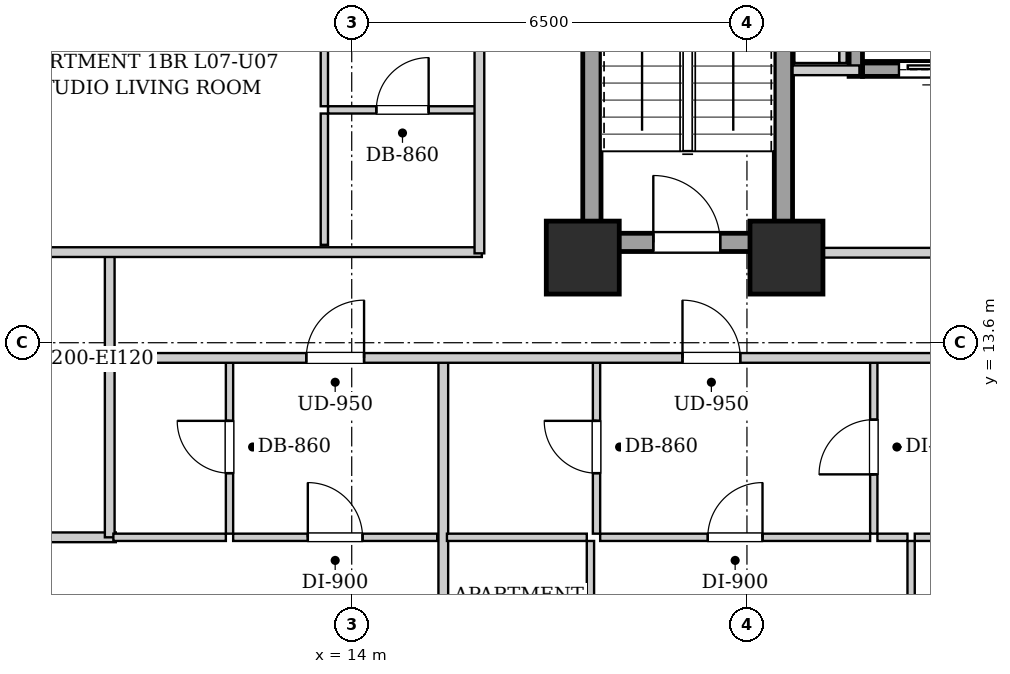
"""IFC4 building model, lengths in metres.
Left out: names, types, materials, properties, quantities, classifications, styles, units other than length and angle.
Written with IfcOpenShell. Run it as: python <this file> out.ifc"""

import sys

from ifc_helpers import new_model, si_unit, direction, frame, frame_2d, origin, origin_2d, place, context, subcontext, project, spatial, rectangle, extrude, element, fill, save


model = new_model("IFC4")
c1 = context("Model", 3, precision=1e-05, world=origin(), true_north=direction((0.0, 1.0)))
c2 = subcontext(c1, "Body", "Model", "MODEL_VIEW")
j1 = project(units=[si_unit("LENGTHUNIT", "METRE"), si_unit("PLANEANGLEUNIT", "RADIAN")], contexts=[c1])
p1 = place(None, origin())
s1 = spatial("IfcSite", under=j1, at=p1, CompositionType="ELEMENT")
p2 = place(p1, origin())
s2 = spatial("IfcBuilding", under=s1, at=p2, CompositionType="ELEMENT")
p3 = place(p2, frame((0.0, 0.0, 32.2)))
s3 = spatial("IfcBuildingStorey", under=s2, at=p3, CompositionType="ELEMENT", Elevation=32.2)
for number, where, z_axis, x_axis in (
    (1, (17.8, 15.0, 0.0), (0.0, 0.0, 1.0), (1.0, 0.0, 0.0)),
    (2, (21.15, 15.0, 0.0), (0.0, 0.0, 1.0), (1.0, 0.0, 0.0)),
):
    element("IfcColumn", number, at=place(p3, frame(where, z_axis=z_axis, x_axis=x_axis)), inside=s3, PredefinedType="COLUMN", context=c2, shape_type="SweptSolid", body=[
        extrude(rectangle(XDim=1.2, YDim=1.2, at=origin_2d()), origin(), (0.0, 0.0, 1.0), 3.2),
    ])
for number, where, z_axis, x_axis in (
    (3, (17.95, 15.1, 0.0), (0.0, 0.0, 1.0), (0.0, 1.0, 0.0)),
    (4, (21.1, 15.1, 0.0), (0.0, 0.0, 1.0), (0.0, 1.0, 0.0)),
):
    element("IfcWall", number, at=place(p3, frame(where, z_axis=z_axis, x_axis=x_axis)), inside=s3, PredefinedType="SHEAR", context=c2, shape_type="SweptSolid", body=[
        extrude(rectangle(XDim=9.0, YDim=0.3, at=frame_2d((4.5, 0.0))), origin(), (0.0, 0.0, 1.0), 2.94),
    ])
p4 = place(p3, frame((18.1, 15.25, 0.0), z_axis=(0.0, 0.0, 1.0), x_axis=(1.0, 0.0, 0.0)))
e5 = element("IfcWall", 5, at=p4, inside=s3, PredefinedType="SHEAR", context=c2, shape_type="SweptSolid", body=[
    extrude(rectangle(XDim=2.85, YDim=0.3, at=frame_2d((1.425, 0.0))), origin(), (0.0, 0.0, 1.0), 2.94),
])
p5 = place(p4, frame((0.86, 0.0, 0.0)))
e6 = element("IfcOpeningElement", 6, at=p5, cuts=e5, PredefinedType="OPENING", context=c2, shape_type="SweptSolid", body=[
    extrude(rectangle(XDim=1.1, YDim=2.05, at=frame_2d((0.55, 1.025))), frame((0.0, 0.16, 0.0), z_axis=(0.0, -1.0, 0.0), x_axis=(1.0, 0.0, 0.0)), (0.0, 0.0, 1.0), 0.32),
])
p6 = place(p3, frame((22.4, 18.09, 0.0), z_axis=(0.0, 0.0, 1.0), x_axis=(1.0, 0.0, 0.0)))
e7 = element("IfcWall", 7, at=p6, inside=s3, PredefinedType="SHEAR", context=c2, shape_type="SweptSolid", body=[
    extrude(rectangle(XDim=2.4, YDim=0.22, at=frame_2d((1.2, 0.0))), origin(), (0.0, 0.0, 1.0), 2.94),
])
p7 = place(p6, frame((0.6, 0.0, 0.0)))
e8 = element("IfcOpeningElement", 8, at=p7, cuts=e7, PredefinedType="OPENING", context=c2, shape_type="SweptSolid", body=[
    extrude(rectangle(XDim=1.2, YDim=2.15, at=frame_2d((0.6, 1.075))), frame((0.0, 0.12, 0.0), z_axis=(0.0, -1.0, 0.0), x_axis=(1.0, 0.0, 0.0)), (0.0, 0.0, 1.0), 0.24),
])
p8 = place(p3, frame((22.29, 17.98, 0.0), z_axis=(0.0, 0.0, 1.0), x_axis=(0.0, 1.0, 0.0)))
e9 = element("IfcWall", 9, at=p8, inside=s3, PredefinedType="SHEAR", context=c2, shape_type="SweptSolid", body=[
    extrude(rectangle(XDim=2.54, YDim=0.22, at=frame_2d((1.27, 0.0))), origin(), (0.0, 0.0, 1.0), 2.94),
])
p9 = place(p3, frame((21.25, 15.08, 0.0), z_axis=(0.0, 0.0, 1.0), x_axis=(1.0, 0.0, 0.0)))
e10 = element("IfcWall", 10, at=p9, inside=s3, PredefinedType="PARTITIONING", context=c2, shape_type="SweptSolid", body=[
    extrude(rectangle(XDim=8.5, YDim=0.16, at=frame_2d((4.25, 0.0))), origin(), (0.0, 0.0, 1.0), 2.155),
])
p10 = place(p9, frame((3.725, 0.0, 0.0)))
e11 = element("IfcOpeningElement", 11, at=p10, cuts=e10, PredefinedType="OPENING", context=c2, shape_type="SweptSolid", body=[
    extrude(rectangle(XDim=1.05, YDim=2.05, at=frame_2d((0.525, 1.025))), frame((0.0, 0.09, 0.0), z_axis=(0.0, -1.0, 0.0), x_axis=(1.0, 0.0, 0.0)), (0.0, 0.0, 1.0), 0.18),
])
p11 = place(p3, frame((21.25, 18.08, 0.0), z_axis=(0.0, 0.0, 1.0), x_axis=(1.0, 0.0, 0.0)))
e12 = element("IfcWall", 12, at=p11, inside=s3, PredefinedType="PARTITIONING", context=c2, shape_type="SweptSolid", body=[
    extrude(rectangle(XDim=1.1, YDim=0.16, at=frame_2d((0.55, 0.0))), origin(), (0.0, 0.0, 1.0), 2.94),
])
p12 = place(p3, frame((22.08, 18.2, 0.0), z_axis=(0.0, 0.0, 1.0), x_axis=(0.0, 1.0, 0.0)))
e13 = element("IfcWall", 13, at=p12, inside=s3, PredefinedType="PARTITIONING", context=c2, shape_type="SweptSolid", body=[
    extrude(rectangle(XDim=2.12, YDim=0.12, at=frame_2d((1.06, 0.0))), origin(), (0.0, 0.0, 1.0), 2.94),
])
p13 = place(p3, frame((10.02, 13.35, 0.0), z_axis=(0.0, 0.0, 1.0), x_axis=(0.0, 1.0, 0.0)))
e14 = element("IfcWall", 14, at=p13, inside=s3, PredefinedType="PARTITIONING", context=c2, shape_type="SweptSolid", body=[
    extrude(rectangle(XDim=1.74, YDim=0.16, at=frame_2d((0.87, 0.0))), origin(), (0.0, 0.0, 1.0), 2.94),
])
p14 = place(p3, frame((7.78, 15.09, 0.0), z_axis=(0.0, 0.0, 1.0), x_axis=(1.0, 0.0, 0.0)))
e15 = element("IfcWall", 15, at=p14, inside=s3, PredefinedType="PARTITIONING", context=c2, shape_type="SweptSolid", body=[
    extrude(rectangle(XDim=8.36, YDim=0.16, at=frame_2d((4.18, 0.0))), origin(), (0.0, 0.0, 1.0), 2.155),
])
p15 = place(p3, frame((7.78, 10.4, 0.0), z_axis=(0.0, 0.0, 1.0), x_axis=(1.0, 0.0, 0.0)))
e16 = element("IfcWall", 16, at=p15, inside=s3, PredefinedType="PARTITIONING", context=c2, shape_type="SweptSolid", body=[
    extrude(rectangle(XDim=2.34, YDim=0.16, at=frame_2d((1.17, 0.0))), origin(), (0.0, 0.0, 1.0), 2.94),
])
p16 = place(p3, frame((10.02, 10.4, 0.0), z_axis=(0.0, 0.0, 1.0), x_axis=(0.0, 1.0, 0.0)))
e17 = element("IfcWall", 17, at=p16, inside=s3, PredefinedType="PARTITIONING", context=c2, shape_type="SweptSolid", body=[
    extrude(rectangle(XDim=2.91, YDim=0.16, at=frame_2d((1.455, 0.0))), origin(), (0.0, 0.0, 1.0), 2.94),
])
p17 = place(p3, frame((11.99, 10.46, 0.0), z_axis=(0.0, 0.0, 1.0), x_axis=(0.0, 1.0, 0.0)))
e18 = element("IfcWall", 18, at=p17, inside=s3, PredefinedType="PARTITIONING", context=c2, shape_type="SweptSolid", body=[
    extrude(rectangle(XDim=2.85, YDim=0.12, at=frame_2d((1.425, 0.0))), origin(), (0.0, 0.0, 1.0), 2.94),
])
p18 = place(p17, frame((0.995, 0.0, 0.0)))
e19 = element("IfcOpeningElement", 19, at=p18, cuts=e18, PredefinedType="OPENING", context=c2, shape_type="SweptSolid", body=[
    extrude(rectangle(XDim=0.86, YDim=2.05, at=frame_2d((0.43, 1.025))), frame((0.0, 0.07, 0.0), z_axis=(0.0, -1.0, 0.0), x_axis=(1.0, 0.0, 0.0)), (0.0, 0.0, 1.0), 0.14),
])
p19 = place(p3, frame((10.08, 10.4, 0.0), z_axis=(0.0, 0.0, 1.0), x_axis=(1.0, 0.0, 0.0)))
e20 = element("IfcWall", 20, at=p19, inside=s3, PredefinedType="PARTITIONING", context=c2, shape_type="SweptSolid", body=[
    extrude(rectangle(XDim=1.85, YDim=0.12, at=frame_2d((0.925, 0.0))), origin(), (0.0, 0.0, 1.0), 2.94),
])
p20 = place(p3, frame((12.05, 10.4, 0.0), z_axis=(0.0, 0.0, 1.0), x_axis=(1.0, 0.0, 0.0)))
e21 = element("IfcWall", 21, at=p20, inside=s3, PredefinedType="PARTITIONING", context=c2, shape_type="SweptSolid", body=[
    extrude(rectangle(XDim=3.356, YDim=0.12, at=frame_2d((1.678, 0.0))), origin(), (0.0, 0.0, 1.0), 2.94),
])
p21 = place(p20, frame((1.228, 0.0, 0.0)))
e22 = element("IfcOpeningElement", 22, at=p21, cuts=e21, PredefinedType="OPENING", context=c2, shape_type="SweptSolid", body=[
    extrude(rectangle(XDim=0.9, YDim=2.05, at=frame_2d((0.45, 1.025))), frame((0.0, 0.07, 0.0), z_axis=(0.0, -1.0, 0.0), x_axis=(1.0, 0.0, 0.0)), (0.0, 0.0, 1.0), 0.14),
])
p22 = place(p3, frame((15.506, 2.26, 0.0), z_axis=(0.0, 0.0, 1.0), x_axis=(0.0, 1.0, 0.0)))
e23 = element("IfcWall", 23, at=p22, inside=s3, PredefinedType="PARTITIONING", context=c2, shape_type="SweptSolid", body=[
    extrude(rectangle(XDim=11.05, YDim=0.16, at=frame_2d((5.525, 0.0))), origin(), (0.0, 0.0, 1.0), 2.94),
])
p23 = place(p3, frame((18.026, 10.46, 0.0), z_axis=(0.0, 0.0, 1.0), x_axis=(0.0, 1.0, 0.0)))
e24 = element("IfcWall", 24, at=p23, inside=s3, PredefinedType="PARTITIONING", context=c2, shape_type="SweptSolid", body=[
    extrude(rectangle(XDim=2.85, YDim=0.12, at=frame_2d((1.425, 0.0))), origin(), (0.0, 0.0, 1.0), 2.94),
])
p24 = place(p23, frame((0.995, 0.0, 0.0)))
e25 = element("IfcOpeningElement", 25, at=p24, cuts=e24, PredefinedType="OPENING", context=c2, shape_type="SweptSolid", body=[
    extrude(rectangle(XDim=0.86, YDim=2.05, at=frame_2d((0.43, 1.025))), frame((0.0, 0.07, 0.0), z_axis=(0.0, -1.0, 0.0), x_axis=(1.0, 0.0, 0.0)), (0.0, 0.0, 1.0), 0.14),
])
p25 = place(p3, frame((15.566, 10.4, 0.0), z_axis=(0.0, 0.0, 1.0), x_axis=(1.0, 0.0, 0.0)))
e26 = element("IfcWall", 26, at=p25, inside=s3, PredefinedType="PARTITIONING", context=c2, shape_type="SweptSolid", body=[
    extrude(rectangle(XDim=2.3, YDim=0.12, at=frame_2d((1.15, 0.0))), origin(), (0.0, 0.0, 1.0), 2.94),
])
p26 = place(p3, frame((22.586, 10.46, 0.0), z_axis=(0.0, 0.0, 1.0), x_axis=(0.0, 1.0, 0.0)))
e27 = element("IfcWall", 27, at=p26, inside=s3, PredefinedType="PARTITIONING", context=c2, shape_type="SweptSolid", body=[
    extrude(rectangle(XDim=2.85, YDim=0.12, at=frame_2d((1.425, 0.0))), origin(), (0.0, 0.0, 1.0), 2.94),
])
p27 = place(p26, frame((0.975, 0.0, 0.0)))
e28 = element("IfcOpeningElement", 28, at=p27, cuts=e27, PredefinedType="OPENING", context=c2, shape_type="SweptSolid", body=[
    extrude(rectangle(XDim=0.9, YDim=2.05, at=frame_2d((0.45, 1.025))), frame((0.0, 0.07, 0.0), z_axis=(0.0, -1.0, 0.0), x_axis=(1.0, 0.0, 0.0)), (0.0, 0.0, 1.0), 0.14),
])
p28 = place(p3, frame((18.086, 10.4, 0.0), z_axis=(0.0, 0.0, 1.0), x_axis=(1.0, 0.0, 0.0)))
e29 = element("IfcWall", 29, at=p28, inside=s3, PredefinedType="PARTITIONING", context=c2, shape_type="SweptSolid", body=[
    extrude(rectangle(XDim=4.44, YDim=0.12, at=frame_2d((2.22, 0.0))), origin(), (0.0, 0.0, 1.0), 2.94),
])
p29 = place(p28, frame((1.77, 0.0, 0.0)))
e30 = element("IfcOpeningElement", 30, at=p29, cuts=e29, PredefinedType="OPENING", context=c2, shape_type="SweptSolid", body=[
    extrude(rectangle(XDim=0.9, YDim=2.05, at=frame_2d((0.45, 1.025))), frame((0.0, 0.07, 0.0), z_axis=(0.0, -1.0, 0.0), x_axis=(1.0, 0.0, 0.0)), (0.0, 0.0, 1.0), 0.14),
])
p30 = place(p3, frame((22.646, 10.4, 0.0), z_axis=(0.0, 0.0, 1.0), x_axis=(1.0, 0.0, 0.0)))
e31 = element("IfcWall", 31, at=p30, inside=s3, PredefinedType="PARTITIONING", context=c2, shape_type="SweptSolid", body=[
    extrude(rectangle(XDim=0.494, YDim=0.12, at=frame_2d((0.247, 0.0))), origin(), (0.0, 0.0, 1.0), 2.94),
])
p31 = place(p3, frame((23.26, 10.4, 0.0), z_axis=(0.0, 0.0, 1.0), x_axis=(1.0, 0.0, 0.0)))
e32 = element("IfcWall", 32, at=p31, inside=s3, PredefinedType="PARTITIONING", context=c2, shape_type="SweptSolid", body=[
    extrude(rectangle(XDim=2.536, YDim=0.12, at=frame_2d((1.268, 0.0))), origin(), (0.0, 0.0, 1.0), 2.94),
])
p32 = place(p31, frame((0.818, 0.0, 0.0)))
e33 = element("IfcOpeningElement", 33, at=p32, cuts=e32, PredefinedType="OPENING", context=c2, shape_type="SweptSolid", body=[
    extrude(rectangle(XDim=0.9, YDim=2.05, at=frame_2d((0.45, 1.025))), frame((0.0, 0.07, 0.0), z_axis=(0.0, -1.0, 0.0), x_axis=(1.0, 0.0, 0.0)), (0.0, 0.0, 1.0), 0.14),
])
p33 = place(p3, frame((17.926, 0.28, 0.0), z_axis=(0.0, 0.0, 1.0), x_axis=(0.0, 1.0, 0.0)))
e34 = element("IfcWall", 34, at=p33, inside=s3, PredefinedType="PARTITIONING", context=c2, shape_type="SweptSolid", body=[
    extrude(rectangle(XDim=10.06, YDim=0.12, at=frame_2d((5.03, 0.0))), origin(), (0.0, 0.0, 1.0), 2.155),
])
p34 = place(p33, frame((4.565, 0.0, 0.0)))
e35 = element("IfcOpeningElement", 35, at=p34, cuts=e34, PredefinedType="OPENING", context=c2, shape_type="SweptSolid", body=[
    extrude(rectangle(XDim=0.9, YDim=2.05, at=frame_2d((0.45, 1.025))), frame((0.0, 0.07, 0.0), z_axis=(0.0, -1.0, 0.0), x_axis=(1.0, 0.0, 0.0)), (0.0, 0.0, 1.0), 0.14),
])
p35 = place(p3, frame((23.2, 0.28, 0.0), z_axis=(0.0, 0.0, 1.0), x_axis=(0.0, 1.0, 0.0)))
e36 = element("IfcWall", 36, at=p35, inside=s3, PredefinedType="PARTITIONING", context=c2, shape_type="SweptSolid", body=[
    extrude(rectangle(XDim=10.06, YDim=0.12, at=frame_2d((5.03, 0.0))), origin(), (0.0, 0.0, 1.0), 2.94),
])
p36 = place(p35, frame((4.565, 0.0, 0.0)))
e37 = element("IfcOpeningElement", 37, at=p36, cuts=e36, PredefinedType="OPENING", context=c2, shape_type="SweptSolid", body=[
    extrude(rectangle(XDim=0.9, YDim=2.05, at=frame_2d((0.45, 1.025))), frame((0.0, 0.07, 0.0), z_axis=(0.0, -1.0, 0.0), x_axis=(1.0, 0.0, 0.0)), (0.0, 0.0, 1.0), 0.14),
])
p37 = place(p3, frame((13.61, 17.429, 0.0), z_axis=(0.0, 0.0, 1.0), x_axis=(1.0, 0.0, 0.0)))
e38 = element("IfcWall", 38, at=p37, inside=s3, PredefinedType="PARTITIONING", context=c2, shape_type="SweptSolid", body=[
    extrude(rectangle(XDim=2.45, YDim=0.12, at=frame_2d((1.225, 0.0))), origin(), (0.0, 0.0, 1.0), 2.94),
])
p38 = place(p37, frame((0.795, 0.0, 0.0)))
e39 = element("IfcOpeningElement", 39, at=p38, cuts=e38, PredefinedType="OPENING", context=c2, shape_type="SweptSolid", body=[
    extrude(rectangle(XDim=0.86, YDim=2.05, at=frame_2d((0.43, 1.025))), frame((0.0, 0.07, 0.0), z_axis=(0.0, -1.0, 0.0), x_axis=(1.0, 0.0, 0.0)), (0.0, 0.0, 1.0), 0.14),
])
p39 = place(p3, frame((13.55, 15.21, 0.0), z_axis=(0.0, 0.0, 1.0), x_axis=(0.0, 1.0, 0.0)))
e40 = element("IfcWall", 40, at=p39, inside=s3, PredefinedType="PARTITIONING", context=c2, shape_type="SweptSolid", body=[
    extrude(rectangle(XDim=2.159, YDim=0.12, at=frame_2d((1.08, 0.0))), origin(), (0.0, 0.0, 1.0), 2.94),
])
p40 = place(p3, frame((13.55, 17.489, 0.0), z_axis=(0.0, 0.0, 1.0), x_axis=(0.0, 1.0, 0.0)))
e41 = element("IfcWall", 41, at=p40, inside=s3, PredefinedType="PARTITIONING", context=c2, shape_type="SweptSolid", body=[
    extrude(rectangle(XDim=5.433, YDim=0.12, at=frame_2d((2.717, 0.0))), origin(), (0.0, 0.0, 1.0), 2.94),
])
p41 = place(p40, frame((2.266, 0.0, 0.0)))
e42 = element("IfcOpeningElement", 42, at=p41, cuts=e41, PredefinedType="OPENING", context=c2, shape_type="SweptSolid", body=[
    extrude(rectangle(XDim=0.9, YDim=2.05, at=frame_2d((0.45, 1.025))), frame((0.0, 0.07, 0.0), z_axis=(0.0, -1.0, 0.0), x_axis=(1.0, 0.0, 0.0)), (0.0, 0.0, 1.0), 0.14),
])
p42 = place(p3, frame((10.05, 13.35, 0.0), z_axis=(0.0, 0.0, 1.0), x_axis=(1.0, 0.0, 0.0)))
e43 = element("IfcWall", 43, at=p42, inside=s3, PredefinedType="PARTITIONING", context=c2, shape_type="SweptSolid", body=[
    extrude(rectangle(XDim=33.9, YDim=0.16, at=frame_2d((16.95, 0.0))), origin(), (0.0, 0.0, 1.0), 2.94),
])
p43 = place(p42, frame((3.203, 0.0, 0.0)))
e44 = element("IfcOpeningElement", 44, at=p43, cuts=e43, PredefinedType="OPENING", context=c2, shape_type="SweptSolid", body=[
    extrude(rectangle(XDim=0.95, YDim=2.1, at=frame_2d((0.475, 1.05))), frame((0.0, 0.09, 0.0), z_axis=(0.0, -1.0, 0.0), x_axis=(1.0, 0.0, 0.0)), (0.0, 0.0, 1.0), 0.18),
])
p44 = place(p42, frame((9.39, 0.0, 0.0)))
e45 = element("IfcOpeningElement", 45, at=p44, cuts=e43, PredefinedType="OPENING", context=c2, shape_type="SweptSolid", body=[
    extrude(rectangle(XDim=0.95, YDim=2.1, at=frame_2d((0.475, 1.05))), frame((0.0, 0.09, 0.0), z_axis=(0.0, -1.0, 0.0), x_axis=(1.0, 0.0, 0.0)), (0.0, 0.0, 1.0), 0.18),
])
p45 = place(p42, frame((28.476, 0.0, 0.0)))
e46 = element("IfcOpeningElement", 46, at=p45, cuts=e43, PredefinedType="OPENING", context=c2, shape_type="SweptSolid", body=[
    extrude(rectangle(XDim=0.95, YDim=2.1, at=frame_2d((0.475, 1.05))), frame((0.0, 0.09, 0.0), z_axis=(0.0, -1.0, 0.0), x_axis=(1.0, 0.0, 0.0)), (0.0, 0.0, 1.0), 0.18),
])
p46 = place(p3, frame((16.1, 15.07, 0.0), z_axis=(0.0, 0.0, 1.0), x_axis=(0.0, 1.0, 0.0)))
e47 = element("IfcWall", 47, at=p46, inside=s3, PredefinedType="PARTITIONING", context=c2, shape_type="SweptSolid", body=[
    extrude(rectangle(XDim=13.93, YDim=0.16, at=frame_2d((6.965, 0.0))), origin(), (0.0, 0.0, 1.0), 2.94),
])
p47 = place(p46, frame((4.661, 0.0, 0.0)))
e48 = element("IfcOpeningElement", 48, at=p47, cuts=e47, PredefinedType="OPENING", context=c2, shape_type="SweptSolid", body=[
    extrude(rectangle(XDim=0.95, YDim=2.1, at=frame_2d((0.475, 1.05))), frame((0.0, 0.09, 0.0), z_axis=(0.0, -1.0, 0.0), x_axis=(1.0, 0.0, 0.0)), (0.0, 0.0, 1.0), 0.18),
])
p48 = place(p46, frame((11.411, 0.0, 0.0)))
e49 = element("IfcOpeningElement", 49, at=p48, cuts=e47, PredefinedType="OPENING", context=c2, shape_type="SweptSolid", body=[
    extrude(rectangle(XDim=0.95, YDim=2.1, at=frame_2d((0.475, 1.05))), frame((0.0, 0.09, 0.0), z_axis=(0.0, -1.0, 0.0), x_axis=(1.0, 0.0, 0.0)), (0.0, 0.0, 1.0), 0.18),
])
p49 = place(p5, origin())
e50 = element("IfcDoor", 50, at=p49, inside=s3, OperationType="SINGLE_SWING_LEFT", PredefinedType="DOOR", context=c2, shape_type="SweptSolid", body=[
    extrude(rectangle(XDim=1.1, YDim=2.05, at=frame_2d((0.55, 1.025))), frame((0.0, 0.025, 0.0), z_axis=(0.0, -1.0, 0.0), x_axis=(1.0, 0.0, 0.0)), (0.0, 0.0, 1.0), 0.05),
])
fill(e6, e50)
p50 = place(p7, origin())
e51 = element("IfcDoor", 51, at=p50, inside=s3, OperationType="SLIDING_TO_LEFT", PredefinedType="DOOR", context=c2, shape_type="SweptSolid", body=[
    extrude(rectangle(XDim=1.2, YDim=2.15, at=frame_2d((0.6, 1.075))), frame((0.0, 0.025, 0.0), z_axis=(0.0, -1.0, 0.0), x_axis=(1.0, 0.0, 0.0)), (0.0, 0.0, 1.0), 0.05),
])
fill(e8, e51)
p51 = place(p18, origin())
e52 = element("IfcDoor", 52, at=p51, inside=s3, OperationType="SINGLE_SWING_RIGHT", PredefinedType="DOOR", context=c2, shape_type="SweptSolid", body=[
    extrude(rectangle(XDim=0.86, YDim=2.05, at=frame_2d((0.43, 1.025))), frame((0.0, 0.025, 0.0), z_axis=(0.0, -1.0, 0.0), x_axis=(1.0, 0.0, 0.0)), (0.0, 0.0, 1.0), 0.05),
])
fill(e19, e52)
p52 = place(p21, origin())
e53 = element("IfcDoor", 53, at=p52, inside=s3, OperationType="SINGLE_SWING_LEFT", PredefinedType="DOOR", context=c2, shape_type="SweptSolid", body=[
    extrude(rectangle(XDim=0.9, YDim=2.05, at=frame_2d((0.45, 1.025))), frame((0.0, 0.025, 0.0), z_axis=(0.0, -1.0, 0.0), x_axis=(1.0, 0.0, 0.0)), (0.0, 0.0, 1.0), 0.05),
])
fill(e22, e53)
p53 = place(p24, origin())
e54 = element("IfcDoor", 54, at=p53, inside=s3, OperationType="SINGLE_SWING_RIGHT", PredefinedType="DOOR", context=c2, shape_type="SweptSolid", body=[
    extrude(rectangle(XDim=0.86, YDim=2.05, at=frame_2d((0.43, 1.025))), frame((0.0, 0.025, 0.0), z_axis=(0.0, -1.0, 0.0), x_axis=(1.0, 0.0, 0.0)), (0.0, 0.0, 1.0), 0.05),
])
fill(e25, e54)
p54 = place(p27, origin())
e55 = element("IfcDoor", 55, at=p54, inside=s3, OperationType="SINGLE_SWING_LEFT", PredefinedType="DOOR", context=c2, shape_type="SweptSolid", body=[
    extrude(rectangle(XDim=0.9, YDim=2.05, at=frame_2d((0.45, 1.025))), frame((0.0, 0.025, 0.0), z_axis=(0.0, -1.0, 0.0), x_axis=(1.0, 0.0, 0.0)), (0.0, 0.0, 1.0), 0.05),
])
fill(e28, e55)
p55 = place(p29, origin())
e56 = element("IfcDoor", 56, at=p55, inside=s3, OperationType="SINGLE_SWING_RIGHT", PredefinedType="DOOR", context=c2, shape_type="SweptSolid", body=[
    extrude(rectangle(XDim=0.9, YDim=2.05, at=frame_2d((0.45, 1.025))), frame((0.0, 0.025, 0.0), z_axis=(0.0, -1.0, 0.0), x_axis=(1.0, 0.0, 0.0)), (0.0, 0.0, 1.0), 0.05),
])
fill(e30, e56)
p56 = place(p38, origin())
e57 = element("IfcDoor", 57, at=p56, inside=s3, OperationType="SINGLE_SWING_RIGHT", PredefinedType="DOOR", context=c2, shape_type="SweptSolid", body=[
    extrude(rectangle(XDim=0.86, YDim=2.05, at=frame_2d((0.43, 1.025))), frame((0.0, 0.025, 0.0), z_axis=(0.0, -1.0, 0.0), x_axis=(1.0, 0.0, 0.0)), (0.0, 0.0, 1.0), 0.05),
])
fill(e39, e57)
p57 = place(p43, origin())
e58 = element("IfcDoor", 58, at=p57, inside=s3, OperationType="SINGLE_SWING_RIGHT", PredefinedType="DOOR", context=c2, shape_type="SweptSolid", body=[
    extrude(rectangle(XDim=0.95, YDim=2.1, at=frame_2d((0.475, 1.05))), frame((0.0, 0.025, 0.0), z_axis=(0.0, -1.0, 0.0), x_axis=(1.0, 0.0, 0.0)), (0.0, 0.0, 1.0), 0.05),
])
fill(e44, e58)
p58 = place(p44, origin())
e59 = element("IfcDoor", 59, at=p58, inside=s3, OperationType="SINGLE_SWING_LEFT", PredefinedType="DOOR", context=c2, shape_type="SweptSolid", body=[
    extrude(rectangle(XDim=0.95, YDim=2.1, at=frame_2d((0.475, 1.05))), frame((0.0, 0.025, 0.0), z_axis=(0.0, -1.0, 0.0), x_axis=(1.0, 0.0, 0.0)), (0.0, 0.0, 1.0), 0.05),
])
fill(e45, e59)
save(model, sys.argv[1])
